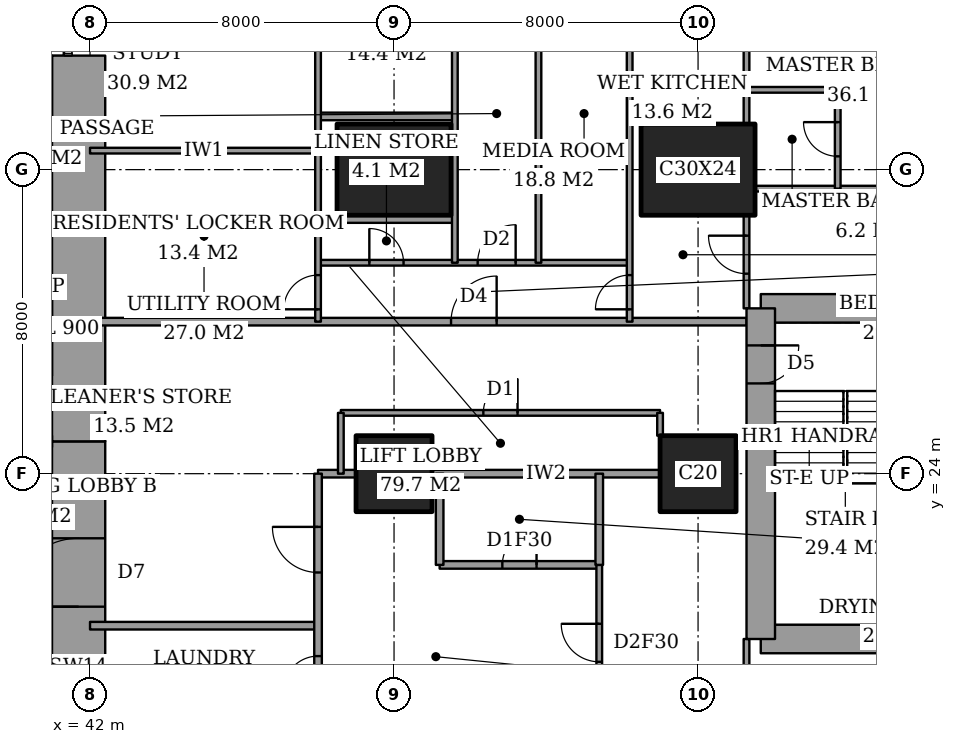
"""IFC4 building model, lengths in metres.
Left out: names, types, materials, properties, quantities, classifications, styles, units other than length and angle.
Written with IfcOpenShell. Run it as: python <this file> out.ifc"""

import sys

from ifc_helpers import new_model, si_unit, direction, frame, frame_2d, origin, origin_2d, place, context, subcontext, project, spatial, rectangle, extrude, element, fill, save


model = new_model("IFC4")
c1 = context("Model", 3, precision=1e-05, world=origin(), true_north=direction((0.0, 1.0)))
c2 = subcontext(c1, "Body", "Model", "MODEL_VIEW")
j1 = project(units=[si_unit("LENGTHUNIT", "METRE"), si_unit("PLANEANGLEUNIT", "RADIAN")], contexts=[c1])
p1 = place(None, origin())
s1 = spatial("IfcSite", under=j1, at=p1, CompositionType="ELEMENT")
p2 = place(p1, origin())
s2 = spatial("IfcBuilding", under=s1, at=p2, CompositionType="ELEMENT")
p3 = place(p2, frame((0.0, 0.0, 125.0)))
s3 = spatial("IfcBuildingStorey", under=s2, at=p3, CompositionType="ELEMENT", Elevation=125.0)
p4 = place(p3, frame((50.0, 24.0, 0.0), z_axis=(0.0, 0.0, 1.0), x_axis=(1.0, 0.0, 0.0)))
e1 = element("IfcColumn", 1, at=p4, inside=s3, PredefinedType="COLUMN", context=c2, shape_type="SweptSolid", body=[
    extrude(rectangle(XDim=2.0, YDim=2.0, at=origin_2d()), origin(), (0.0, 0.0, 1.0), 3.6),
])
p5 = place(p3, frame((50.0, 32.0, 0.0), z_axis=(0.0, 0.0, 1.0), x_axis=(1.0, 0.0, 0.0)))
e2 = element("IfcColumn", 2, at=p5, inside=s3, PredefinedType="COLUMN", context=c2, shape_type="SweptSolid", body=[
    extrude(rectangle(XDim=3.0, YDim=2.4, at=origin_2d()), origin(), (0.0, 0.0, 1.0), 3.6),
])
p6 = place(p3, frame((58.0, 24.0, 0.0), z_axis=(0.0, 0.0, 1.0), x_axis=(1.0, 0.0, 0.0)))
e3 = element("IfcColumn", 3, at=p6, inside=s3, PredefinedType="COLUMN", context=c2, shape_type="SweptSolid", body=[
    extrude(rectangle(XDim=2.0, YDim=2.0, at=origin_2d()), origin(), (0.0, 0.0, 1.0), 3.6),
])
p7 = place(p3, frame((58.0, 32.0, 0.0), z_axis=(0.0, 0.0, 1.0), x_axis=(1.0, 0.0, 0.0)))
e4 = element("IfcColumn", 4, at=p7, inside=s3, PredefinedType="COLUMN", context=c2, shape_type="SweptSolid", body=[
    extrude(rectangle(XDim=3.0, YDim=2.4, at=origin_2d()), origin(), (0.0, 0.0, 1.0), 3.6),
])
p8 = place(p3, frame((41.7, 13.0, 0.0), z_axis=(0.0, 0.0, 1.0), x_axis=(0.0, 1.0, 0.0)))
e5 = element("IfcWall", 5, at=p8, inside=s3, PredefinedType="SHEAR", context=c2, shape_type="SweptSolid", body=[
    extrude(rectangle(XDim=11.85, YDim=1.4, at=frame_2d((5.925, 0.0))), origin(), (0.0, 0.0, 1.0), 3.6),
])
p9 = place(p8, frame((7.5, 0.0, 0.0)))
e6 = element("IfcOpeningElement", 6, at=p9, cuts=e5, PredefinedType="OPENING", context=c2, shape_type="SweptSolid", body=[
    extrude(rectangle(XDim=1.8, YDim=2.4, at=frame_2d((0.9, 1.2))), frame((0.0, 0.71, 0.0), z_axis=(0.0, -1.0, 0.0), x_axis=(1.0, 0.0, 0.0)), (0.0, 0.0, 1.0), 1.42),
])
p10 = place(p3, frame((41.7, 24.85, 0.0), z_axis=(0.0, 0.0, 1.0), x_axis=(0.0, 1.0, 0.0)))
e7 = element("IfcWall", 7, at=p10, inside=s3, PredefinedType="SHEAR", context=c2, shape_type="SweptSolid", body=[
    extrude(rectangle(XDim=10.15, YDim=1.4, at=frame_2d((5.075, 0.0))), origin(), (0.0, 0.0, 1.0), 3.6),
])
for number, where, z_axis, x_axis in (
    (8, (59.65, 19.65, 0.0), (0.0, 0.0, 1.0), (1.0, 0.0, 0.0)),
    (9, (64.1, 28.35, 0.0), (0.0, 0.0, 1.0), (-1.0, 0.0, 0.0)),
):
    element("IfcWall", number, at=place(p3, frame(where, z_axis=z_axis, x_axis=x_axis)), inside=s3, PredefinedType="SHEAR", context=c2, shape_type="SweptSolid", body=[
        extrude(rectangle(XDim=4.45, YDim=0.75, at=frame_2d((2.225, 0.0))), origin(), (0.0, 0.0, 1.0), 3.6),
    ])
p11 = place(p3, frame((59.65, 28.35, 0.0), z_axis=(0.0, 0.0, 1.0), x_axis=(0.0, -1.0, 0.0)))
e10 = element("IfcWall", 10, at=p11, inside=s3, PredefinedType="SHEAR", context=c2, shape_type="SweptSolid", body=[
    extrude(rectangle(XDim=8.7, YDim=0.75, at=frame_2d((4.35, 0.0))), origin(), (0.0, 0.0, 1.0), 3.6),
])
p12 = place(p11, frame((0.975, 0.0, 0.0)))
e11 = element("IfcOpeningElement", 11, at=p12, cuts=e10, PredefinedType="OPENING", context=c2, shape_type="SweptSolid", body=[
    extrude(rectangle(XDim=1.0, YDim=2.1, at=frame_2d((0.5, 1.05))), frame((0.0, 0.385, 0.0), z_axis=(0.0, -1.0, 0.0), x_axis=(1.0, 0.0, 0.0)), (0.0, 0.0, 1.0), 0.77),
])
p13 = place(p3, frame((42.0, 20.0, 0.0), z_axis=(0.0, 0.0, 1.0), x_axis=(1.0, 0.0, 0.0)))
e12 = element("IfcWall", 12, at=p13, inside=s3, PredefinedType="PARTITIONING", context=c2, shape_type="SweptSolid", body=[
    extrude(rectangle(XDim=6.0, YDim=0.2, at=frame_2d((3.0, 0.0))), origin(), (0.0, 0.0, 1.0), 3.35),
])
p14 = place(p3, frame((51.2, 21.6, 0.0), z_axis=(0.0, 0.0, 1.0), x_axis=(1.0, 0.0, 0.0)))
e13 = element("IfcWall", 13, at=p14, inside=s3, PredefinedType="PARTITIONING", context=c2, shape_type="SweptSolid", body=[
    extrude(rectangle(XDim=4.2, YDim=0.2, at=frame_2d((2.1, 0.0))), origin(), (0.0, 0.0, 1.0), 3.35),
])
p15 = place(p14, frame((1.65, 0.0, 0.0)))
e14 = element("IfcOpeningElement", 14, at=p15, cuts=e13, PredefinedType="OPENING", context=c2, shape_type="SweptSolid", body=[
    extrude(rectangle(XDim=0.9, YDim=2.1, at=frame_2d((0.45, 1.05))), frame((0.0, 0.11, 0.0), z_axis=(0.0, -1.0, 0.0), x_axis=(1.0, 0.0, 0.0)), (0.0, 0.0, 1.0), 0.22),
])
p16 = place(p3, frame((48.0, 24.0, 0.0), z_axis=(0.0, 0.0, 1.0), x_axis=(1.0, 0.0, 0.0)))
e15 = element("IfcWall", 15, at=p16, inside=s3, PredefinedType="PARTITIONING", context=c2, shape_type="SweptSolid", body=[
    extrude(rectangle(XDim=1.0, YDim=0.2, at=frame_2d((0.5, 0.0))), origin(), (0.0, 0.0, 1.0), 3.35),
])
p17 = place(p3, frame((51.0, 24.0, 0.0), z_axis=(0.0, 0.0, 1.0), x_axis=(1.0, 0.0, 0.0)))
e16 = element("IfcWall", 16, at=p17, inside=s3, PredefinedType="PARTITIONING", context=c2, shape_type="SweptSolid", body=[
    extrude(rectangle(XDim=6.0, YDim=0.2, at=frame_2d((3.0, 0.0))), origin(), (0.0, 0.0, 1.0), 3.35),
])
p18 = place(p3, frame((48.6, 25.6, 0.0), z_axis=(0.0, 0.0, 1.0), x_axis=(1.0, 0.0, 0.0)))
e17 = element("IfcWall", 17, at=p18, inside=s3, PredefinedType="PARTITIONING", context=c2, shape_type="SweptSolid", body=[
    extrude(rectangle(XDim=8.4, YDim=0.15, at=frame_2d((4.2, 0.0))), origin(), (0.0, 0.0, 1.0), 3.35),
])
p19 = place(p18, frame((3.75, 0.0, 0.0)))
e18 = element("IfcOpeningElement", 18, at=p19, cuts=e17, PredefinedType="OPENING", context=c2, shape_type="SweptSolid", body=[
    extrude(rectangle(XDim=0.9, YDim=2.1, at=frame_2d((0.45, 1.05))), frame((0.0, 0.085, 0.0), z_axis=(0.0, -1.0, 0.0), x_axis=(1.0, 0.0, 0.0)), (0.0, 0.0, 1.0), 0.17),
])
p20 = place(p3, frame((42.0, 28.0, 0.0), z_axis=(0.0, 0.0, 1.0), x_axis=(1.0, 0.0, 0.0)))
e19 = element("IfcWall", 19, at=p20, inside=s3, PredefinedType="PARTITIONING", context=c2, shape_type="SweptSolid", body=[
    extrude(rectangle(XDim=17.275, YDim=0.2, at=frame_2d((8.637, 0.0))), origin(), (0.0, 0.0, 1.0), 3.35),
])
p21 = place(p20, frame((9.5, 0.0, 0.0)))
e20 = element("IfcOpeningElement", 20, at=p21, cuts=e19, PredefinedType="OPENING", context=c2, shape_type="SweptSolid", body=[
    extrude(rectangle(XDim=1.2, YDim=2.4, at=frame_2d((0.6, 1.2))), frame((0.0, 0.11, 0.0), z_axis=(0.0, -1.0, 0.0), x_axis=(1.0, 0.0, 0.0)), (0.0, 0.0, 1.0), 0.22),
])
p22 = place(p3, frame((48.0, 29.55, 0.0), z_axis=(0.0, 0.0, 1.0), x_axis=(1.0, 0.0, 0.0)))
e21 = element("IfcWall", 21, at=p22, inside=s3, PredefinedType="PARTITIONING", context=c2, shape_type="SweptSolid", body=[
    extrude(rectangle(XDim=8.2, YDim=0.15, at=frame_2d((4.1, 0.0))), origin(), (0.0, 0.0, 1.0), 3.35),
])
p23 = place(p22, frame((4.2, 0.0, 0.0)))
e22 = element("IfcOpeningElement", 22, at=p23, cuts=e21, PredefinedType="OPENING", context=c2, shape_type="SweptSolid", body=[
    extrude(rectangle(XDim=1.0, YDim=2.1, at=frame_2d((0.5, 1.05))), frame((0.0, 0.085, 0.0), z_axis=(0.0, -1.0, 0.0), x_axis=(1.0, 0.0, 0.0)), (0.0, 0.0, 1.0), 0.17),
])
p24 = place(p22, frame((1.35, 0.0, 0.0)))
e23 = element("IfcOpeningElement", 23, at=p24, cuts=e21, PredefinedType="OPENING", context=c2, shape_type="SweptSolid", body=[
    extrude(rectangle(XDim=0.9, YDim=2.1, at=frame_2d((0.45, 1.05))), frame((0.0, 0.085, 0.0), z_axis=(0.0, -1.0, 0.0), x_axis=(1.0, 0.0, 0.0)), (0.0, 0.0, 1.0), 0.17),
])
p25 = place(p3, frame((48.0, 30.7, 0.0), z_axis=(0.0, 0.0, 1.0), x_axis=(1.0, 0.0, 0.0)))
e24 = element("IfcWall", 24, at=p25, inside=s3, PredefinedType="PARTITIONING", context=c2, shape_type="SweptSolid", body=[
    extrude(rectangle(XDim=3.6, YDim=0.2, at=frame_2d((1.8, 0.0))), origin(), (0.0, 0.0, 1.0), 3.35),
])
p26 = place(p3, frame((59.5, 31.5, 0.0), z_axis=(0.0, 0.0, 1.0), x_axis=(1.0, 0.0, 0.0)))
e25 = element("IfcWall", 25, at=p26, inside=s3, PredefinedType="PARTITIONING", context=c2, shape_type="SweptSolid", body=[
    extrude(rectangle(XDim=5.15, YDim=0.15, at=frame_2d((2.575, 0.0))), origin(), (0.0, 0.0, 1.0), 3.35),
])
p27 = place(p3, frame((42.0, 32.5, 0.0), z_axis=(0.0, 0.0, 1.0), x_axis=(1.0, 0.0, 0.0)))
e26 = element("IfcWall", 26, at=p27, inside=s3, PredefinedType="PARTITIONING", context=c2, shape_type="SweptSolid", body=[
    extrude(rectangle(XDim=6.0, YDim=0.15, at=frame_2d((3.0, 0.0))), origin(), (0.0, 0.0, 1.0), 3.35),
])
p28 = place(p3, frame((48.0, 33.4, 0.0), z_axis=(0.0, 0.0, 1.0), x_axis=(1.0, 0.0, 0.0)))
e27 = element("IfcWall", 27, at=p28, inside=s3, PredefinedType="PARTITIONING", context=c2, shape_type="SweptSolid", body=[
    extrude(rectangle(XDim=3.6, YDim=0.2, at=frame_2d((1.8, 0.0))), origin(), (0.0, 0.0, 1.0), 3.35),
])
p29 = place(p3, frame((59.275, 34.1, 0.0), z_axis=(0.0, 0.0, 1.0), x_axis=(1.0, 0.0, 0.0)))
e28 = element("IfcWall", 28, at=p29, inside=s3, PredefinedType="PARTITIONING", context=c2, shape_type="SweptSolid", body=[
    extrude(rectangle(XDim=2.4, YDim=0.15, at=frame_2d((1.2, 0.0))), origin(), (0.0, 0.0, 1.0), 3.35),
])
p30 = place(p3, frame((48.0, 17.5, 0.0), z_axis=(0.0, 0.0, 1.0), x_axis=(0.0, 1.0, 0.0)))
e29 = element("IfcWall", 29, at=p30, inside=s3, PredefinedType="PARTITIONING", context=c2, shape_type="SweptSolid", body=[
    extrude(rectangle(XDim=6.5, YDim=0.2, at=frame_2d((3.25, 0.0))), origin(), (0.0, 0.0, 1.0), 3.35),
])
p31 = place(p30, frame((3.9, 0.0, 0.0)))
e30 = element("IfcOpeningElement", 30, at=p31, cuts=e29, PredefinedType="OPENING", context=c2, shape_type="SweptSolid", body=[
    extrude(rectangle(XDim=1.2, YDim=2.4, at=frame_2d((0.6, 1.2))), frame((0.0, 0.11, 0.0), z_axis=(0.0, -1.0, 0.0), x_axis=(1.0, 0.0, 0.0)), (0.0, 0.0, 1.0), 0.22),
])
p32 = place(p30, frame((0.8, 0.0, 0.0)))
e31 = element("IfcOpeningElement", 31, at=p32, cuts=e29, PredefinedType="OPENING", context=c2, shape_type="SweptSolid", body=[
    extrude(rectangle(XDim=0.9, YDim=2.1, at=frame_2d((0.45, 1.05))), frame((0.0, 0.11, 0.0), z_axis=(0.0, -1.0, 0.0), x_axis=(1.0, 0.0, 0.0)), (0.0, 0.0, 1.0), 0.22),
])
p33 = place(p3, frame((48.0, 28.0, 0.0), z_axis=(0.0, 0.0, 1.0), x_axis=(0.0, 1.0, 0.0)))
e32 = element("IfcWall", 32, at=p33, inside=s3, PredefinedType="PARTITIONING", context=c2, shape_type="SweptSolid", body=[
    extrude(rectangle(XDim=9.4, YDim=0.15, at=frame_2d((4.7, 0.0))), origin(), (0.0, 0.0, 1.0), 3.35),
])
p34 = place(p33, frame((0.325, 0.0, 0.0)))
e33 = element("IfcOpeningElement", 33, at=p34, cuts=e32, PredefinedType="OPENING", context=c2, shape_type="SweptSolid", body=[
    extrude(rectangle(XDim=0.9, YDim=2.1, at=frame_2d((0.45, 1.05))), frame((0.0, 0.085, 0.0), z_axis=(0.0, -1.0, 0.0), x_axis=(1.0, 0.0, 0.0)), (0.0, 0.0, 1.0), 0.17),
])
p35 = place(p3, frame((48.6, 24.0, 0.0), z_axis=(0.0, 0.0, 1.0), x_axis=(0.0, 1.0, 0.0)))
e34 = element("IfcWall", 34, at=p35, inside=s3, PredefinedType="PARTITIONING", context=c2, shape_type="SweptSolid", body=[
    extrude(rectangle(XDim=1.6, YDim=0.15, at=frame_2d((0.8, 0.0))), origin(), (0.0, 0.0, 1.0), 3.35),
])
p36 = place(p3, frame((51.2, 21.6, 0.0), z_axis=(0.0, 0.0, 1.0), x_axis=(0.0, 1.0, 0.0)))
e35 = element("IfcWall", 35, at=p36, inside=s3, PredefinedType="PARTITIONING", context=c2, shape_type="SweptSolid", body=[
    extrude(rectangle(XDim=2.4, YDim=0.2, at=frame_2d((1.2, 0.0))), origin(), (0.0, 0.0, 1.0), 3.35),
])
for number, where, z_axis, x_axis in (
    (36, (51.6, 29.55, 0.0), (0.0, 0.0, 1.0), (0.0, 1.0, 0.0)),
    (37, (53.8, 29.55, 0.0), (0.0, 0.0, 1.0), (0.0, 1.0, 0.0)),
):
    element("IfcWall", number, at=place(p3, frame(where, z_axis=z_axis, x_axis=x_axis)), inside=s3, PredefinedType="PARTITIONING", context=c2, shape_type="SweptSolid", body=[
        extrude(rectangle(XDim=7.85, YDim=0.15, at=frame_2d((3.925, 0.0))), origin(), (0.0, 0.0, 1.0), 3.35),
    ])
p37 = place(p3, frame((55.4, 21.6, 0.0), z_axis=(0.0, 0.0, 1.0), x_axis=(0.0, 1.0, 0.0)))
e38 = element("IfcWall", 38, at=p37, inside=s3, PredefinedType="PARTITIONING", context=c2, shape_type="SweptSolid", body=[
    extrude(rectangle(XDim=2.4, YDim=0.2, at=frame_2d((1.2, 0.0))), origin(), (0.0, 0.0, 1.0), 3.35),
])
p38 = place(p3, frame((55.4, 10.8, 0.0), z_axis=(0.0, 0.0, 1.0), x_axis=(0.0, 1.0, 0.0)))
e39 = element("IfcWall", 39, at=p38, inside=s3, PredefinedType="PARTITIONING", context=c2, shape_type="SweptSolid", body=[
    extrude(rectangle(XDim=10.8, YDim=0.15, at=frame_2d((5.4, 0.0))), origin(), (0.0, 0.0, 1.0), 3.35),
])
p39 = place(p38, frame((8.25, 0.0, 0.0)))
e40 = element("IfcOpeningElement", 40, at=p39, cuts=e39, PredefinedType="OPENING", context=c2, shape_type="SweptSolid", body=[
    extrude(rectangle(XDim=1.0, YDim=2.1, at=frame_2d((0.5, 1.05))), frame((0.0, 0.085, 0.0), z_axis=(0.0, -1.0, 0.0), x_axis=(1.0, 0.0, 0.0)), (0.0, 0.0, 1.0), 0.17),
])
p40 = place(p3, frame((56.2, 28.0, 0.0), z_axis=(0.0, 0.0, 1.0), x_axis=(0.0, 1.0, 0.0)))
e41 = element("IfcWall", 41, at=p40, inside=s3, PredefinedType="PARTITIONING", context=c2, shape_type="SweptSolid", body=[
    extrude(rectangle(XDim=9.4, YDim=0.15, at=frame_2d((4.7, 0.0))), origin(), (0.0, 0.0, 1.0), 3.35),
])
p41 = place(p40, frame((0.325, 0.0, 0.0)))
e42 = element("IfcOpeningElement", 42, at=p41, cuts=e41, PredefinedType="OPENING", context=c2, shape_type="SweptSolid", body=[
    extrude(rectangle(XDim=0.9, YDim=2.1, at=frame_2d((0.45, 1.05))), frame((0.0, 0.085, 0.0), z_axis=(0.0, -1.0, 0.0), x_axis=(1.0, 0.0, 0.0)), (0.0, 0.0, 1.0), 0.17),
])
p42 = place(p3, frame((57.0, 25.0, 0.0), z_axis=(0.0, 0.0, 1.0), x_axis=(0.0, 1.0, 0.0)))
e43 = element("IfcWall", 43, at=p42, inside=s3, PredefinedType="PARTITIONING", context=c2, shape_type="SweptSolid", body=[
    extrude(rectangle(XDim=0.6, YDim=0.15, at=frame_2d((0.3, 0.0))), origin(), (0.0, 0.0, 1.0), 3.35),
])
p43 = place(p3, frame((59.275, 17.2, 0.0), z_axis=(0.0, 0.0, 1.0), x_axis=(0.0, 1.0, 0.0)))
e44 = element("IfcWall", 44, at=p43, inside=s3, PredefinedType="PARTITIONING", context=c2, shape_type="SweptSolid", body=[
    extrude(rectangle(XDim=2.45, YDim=0.15, at=frame_2d((1.225, 0.0))), origin(), (0.0, 0.0, 1.0), 3.35),
])
p44 = place(p43, frame((0.587, 0.0, 0.0)))
e45 = element("IfcOpeningElement", 45, at=p44, cuts=e44, PredefinedType="OPENING", context=c2, shape_type="SweptSolid", body=[
    extrude(rectangle(XDim=0.9, YDim=2.1, at=frame_2d((0.45, 1.05))), frame((0.0, 0.085, 0.0), z_axis=(0.0, -1.0, 0.0), x_axis=(1.0, 0.0, 0.0)), (0.0, 0.0, 1.0), 0.17),
])
p45 = place(p3, frame((59.275, 28.35, 0.0), z_axis=(0.0, 0.0, 1.0), x_axis=(0.0, 1.0, 0.0)))
e46 = element("IfcWall", 46, at=p45, inside=s3, PredefinedType="PARTITIONING", context=c2, shape_type="SweptSolid", body=[
    extrude(rectangle(XDim=2.45, YDim=0.15, at=frame_2d((1.225, 0.0))), origin(), (0.0, 0.0, 1.0), 3.35),
])
p46 = place(p45, frame((0.913, 0.0, 0.0)))
e47 = element("IfcOpeningElement", 47, at=p46, cuts=e46, PredefinedType="OPENING", context=c2, shape_type="SweptSolid", body=[
    extrude(rectangle(XDim=1.0, YDim=2.1, at=frame_2d((0.5, 1.05))), frame((0.0, 0.085, 0.0), z_axis=(0.0, -1.0, 0.0), x_axis=(1.0, 0.0, 0.0)), (0.0, 0.0, 1.0), 0.17),
])
p47 = place(p3, frame((59.275, 33.2, 0.0), z_axis=(0.0, 0.0, 1.0), x_axis=(0.0, 1.0, 0.0)))
e48 = element("IfcWall", 48, at=p47, inside=s3, PredefinedType="PARTITIONING", context=c2, shape_type="SweptSolid", body=[
    extrude(rectangle(XDim=4.2, YDim=0.15, at=frame_2d((2.1, 0.0))), origin(), (0.0, 0.0, 1.0), 3.35),
])
p48 = place(p3, frame((61.675, 31.5, 0.0), z_axis=(0.0, 0.0, 1.0), x_axis=(0.0, 1.0, 0.0)))
e49 = element("IfcWall", 49, at=p48, inside=s3, PredefinedType="PARTITIONING", context=c2, shape_type="SweptSolid", body=[
    extrude(rectangle(XDim=2.6, YDim=0.15, at=frame_2d((1.3, 0.0))), origin(), (0.0, 0.0, 1.0), 3.35),
])
p49 = place(p48, frame((0.85, 0.0, 0.0)))
e50 = element("IfcOpeningElement", 50, at=p49, cuts=e49, PredefinedType="OPENING", context=c2, shape_type="SweptSolid", body=[
    extrude(rectangle(XDim=0.9, YDim=2.1, at=frame_2d((0.45, 1.05))), frame((0.0, 0.085, 0.0), z_axis=(0.0, -1.0, 0.0), x_axis=(1.0, 0.0, 0.0)), (0.0, 0.0, 1.0), 0.17),
])
p50 = place(p39, origin())
e51 = element("IfcDoor", 51, at=p50, inside=s3, OperationType="SINGLE_SWING_LEFT", PredefinedType="DOOR", context=c2, shape_type="SweptSolid", body=[
    extrude(rectangle(XDim=1.0, YDim=2.1, at=frame_2d((0.5, 1.05))), frame((0.0, 0.025, 0.0), z_axis=(0.0, -1.0, 0.0), x_axis=(1.0, 0.0, 0.0)), (0.0, 0.0, 1.0), 0.05),
])
fill(e40, e51)
p51 = place(p15, origin())
e52 = element("IfcDoor", 52, at=p51, inside=s3, OperationType="SINGLE_SWING_LEFT", PredefinedType="DOOR", context=c2, shape_type="SweptSolid", body=[
    extrude(rectangle(XDim=0.9, YDim=2.1, at=frame_2d((0.45, 1.05))), frame((0.0, 0.025, 0.0), z_axis=(0.0, -1.0, 0.0), x_axis=(1.0, 0.0, 0.0)), (0.0, 0.0, 1.0), 0.05),
])
fill(e14, e52)
p52 = place(p31, origin())
e53 = element("IfcDoor", 53, at=p52, inside=s3, OperationType="SINGLE_SWING_LEFT", PredefinedType="DOOR", context=c2, shape_type="SweptSolid", body=[
    extrude(rectangle(XDim=1.2, YDim=2.4, at=frame_2d((0.6, 1.2))), frame((0.0, 0.025, 0.0), z_axis=(0.0, -1.0, 0.0), x_axis=(1.0, 0.0, 0.0)), (0.0, 0.0, 1.0), 0.05),
])
fill(e30, e53)
p53 = place(p32, origin())
e54 = element("IfcDoor", 54, at=p53, inside=s3, OperationType="SINGLE_SWING_RIGHT", PredefinedType="DOOR", context=c2, shape_type="SweptSolid", body=[
    extrude(rectangle(XDim=0.9, YDim=2.1, at=frame_2d((0.45, 1.05))), frame((0.0, 0.025, 0.0), z_axis=(0.0, -1.0, 0.0), x_axis=(1.0, 0.0, 0.0)), (0.0, 0.0, 1.0), 0.05),
])
fill(e31, e54)
p54 = place(p49, origin())
e55 = element("IfcDoor", 55, at=p54, inside=s3, OperationType="SINGLE_SWING_LEFT", PredefinedType="DOOR", context=c2, shape_type="SweptSolid", body=[
    extrude(rectangle(XDim=0.9, YDim=2.1, at=frame_2d((0.45, 1.05))), frame((0.0, 0.025, 0.0), z_axis=(0.0, -1.0, 0.0), x_axis=(1.0, 0.0, 0.0)), (0.0, 0.0, 1.0), 0.05),
])
fill(e50, e55)
p55 = place(p46, origin())
e56 = element("IfcDoor", 56, at=p55, inside=s3, OperationType="SINGLE_SWING_LEFT", PredefinedType="DOOR", context=c2, shape_type="SweptSolid", body=[
    extrude(rectangle(XDim=1.0, YDim=2.1, at=frame_2d((0.5, 1.05))), frame((0.0, 0.025, 0.0), z_axis=(0.0, -1.0, 0.0), x_axis=(1.0, 0.0, 0.0)), (0.0, 0.0, 1.0), 0.05),
])
fill(e47, e56)
p56 = place(p41, origin())
e57 = element("IfcDoor", 57, at=p56, inside=s3, OperationType="SINGLE_SWING_RIGHT", PredefinedType="DOOR", context=c2, shape_type="SweptSolid", body=[
    extrude(rectangle(XDim=0.9, YDim=2.1, at=frame_2d((0.45, 1.05))), frame((0.0, 0.025, 0.0), z_axis=(0.0, -1.0, 0.0), x_axis=(1.0, 0.0, 0.0)), (0.0, 0.0, 1.0), 0.05),
])
fill(e42, e57)
p57 = place(p21, origin())
e58 = element("IfcDoor", 58, at=p57, inside=s3, OperationType="SINGLE_SWING_LEFT", PredefinedType="DOOR", context=c2, shape_type="SweptSolid", body=[
    extrude(rectangle(XDim=1.2, YDim=2.4, at=frame_2d((0.6, 1.2))), frame((0.0, 0.025, 0.0), z_axis=(0.0, -1.0, 0.0), x_axis=(1.0, 0.0, 0.0)), (0.0, 0.0, 1.0), 0.05),
])
fill(e20, e58)
p58 = place(p23, origin())
e59 = element("IfcDoor", 59, at=p58, inside=s3, OperationType="SINGLE_SWING_LEFT", PredefinedType="DOOR", context=c2, shape_type="SweptSolid", body=[
    extrude(rectangle(XDim=1.0, YDim=2.1, at=frame_2d((0.5, 1.05))), frame((0.0, 0.025, 0.0), z_axis=(0.0, -1.0, 0.0), x_axis=(1.0, 0.0, 0.0)), (0.0, 0.0, 1.0), 0.05),
])
fill(e22, e59)
p59 = place(p24, origin())
e60 = element("IfcDoor", 60, at=p59, inside=s3, OperationType="SINGLE_SWING_RIGHT", PredefinedType="DOOR", context=c2, shape_type="SweptSolid", body=[
    extrude(rectangle(XDim=0.9, YDim=2.1, at=frame_2d((0.45, 1.05))), frame((0.0, 0.025, 0.0), z_axis=(0.0, -1.0, 0.0), x_axis=(1.0, 0.0, 0.0)), (0.0, 0.0, 1.0), 0.05),
])
fill(e23, e60)
p60 = place(p34, origin())
e61 = element("IfcDoor", 61, at=p60, inside=s3, OperationType="SINGLE_SWING_RIGHT", PredefinedType="DOOR", context=c2, shape_type="SweptSolid", body=[
    extrude(rectangle(XDim=0.9, YDim=2.1, at=frame_2d((0.45, 1.05))), frame((0.0, 0.025, 0.0), z_axis=(0.0, -1.0, 0.0), x_axis=(1.0, 0.0, 0.0)), (0.0, 0.0, 1.0), 0.05),
])
fill(e33, e61)
p61 = place(p19, origin())
e62 = element("IfcDoor", 62, at=p61, inside=s3, OperationType="SINGLE_SWING_LEFT", PredefinedType="DOOR", context=c2, shape_type="SweptSolid", body=[
    extrude(rectangle(XDim=0.9, YDim=2.1, at=frame_2d((0.45, 1.05))), frame((0.0, 0.025, 0.0), z_axis=(0.0, -1.0, 0.0), x_axis=(1.0, 0.0, 0.0)), (0.0, 0.0, 1.0), 0.05),
])
fill(e18, e62)
p62 = place(p9, origin())
e63 = element("IfcDoor", 63, at=p62, inside=s3, OperationType="DOUBLE_DOOR_DOUBLE_SWING", PredefinedType="DOOR", context=c2, shape_type="SweptSolid", body=[
    extrude(rectangle(XDim=1.8, YDim=2.4, at=frame_2d((0.9, 1.2))), frame((0.0, 0.025, 0.0), z_axis=(0.0, -1.0, 0.0), x_axis=(1.0, 0.0, 0.0)), (0.0, 0.0, 1.0), 0.05),
])
fill(e6, e63)
p63 = place(p12, origin())
e64 = element("IfcDoor", 64, at=p63, inside=s3, OperationType="SINGLE_SWING_RIGHT", PredefinedType="DOOR", context=c2, shape_type="SweptSolid", body=[
    extrude(rectangle(XDim=1.0, YDim=2.1, at=frame_2d((0.5, 1.05))), frame((0.0, 0.025, 0.0), z_axis=(0.0, -1.0, 0.0), x_axis=(1.0, 0.0, 0.0)), (0.0, 0.0, 1.0), 0.05),
])
fill(e11, e64)
save(model, sys.argv[1])
